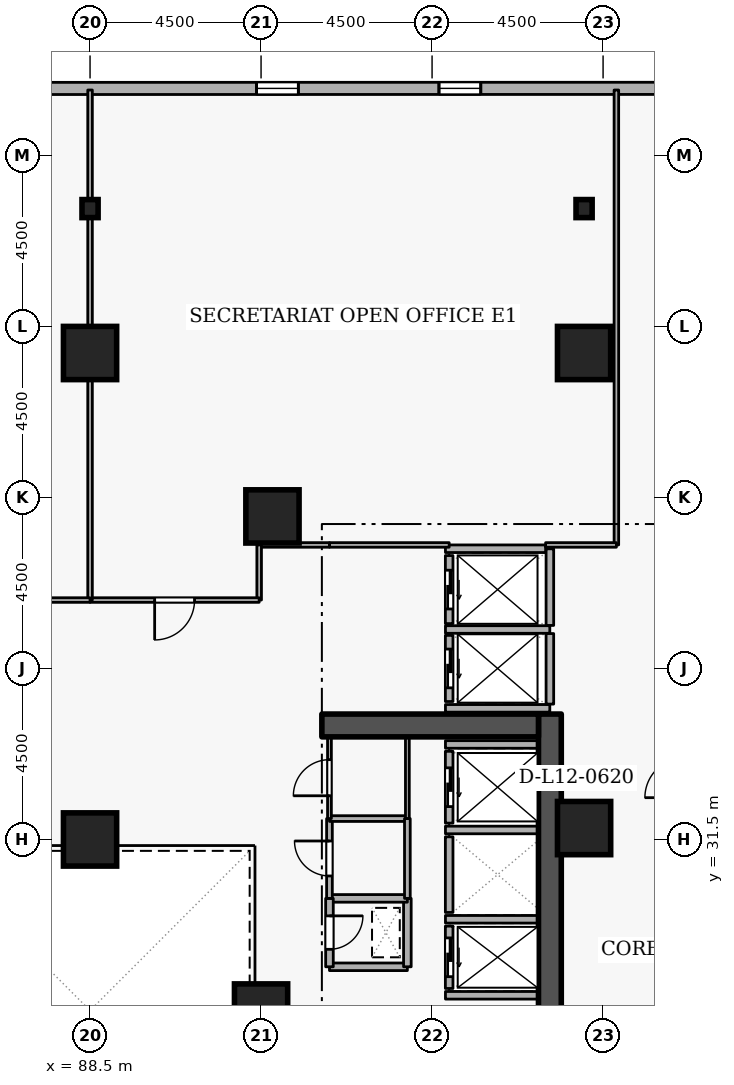
"""IFC4 building model, lengths in metres.
Left out: names, types, materials, properties, quantities, classifications, styles, units other than length and angle.
Written with IfcOpenShell. Run it as: python <this file> out.ifc"""

import sys

from ifc_helpers import new_model, si_unit, direction, frame, frame_2d, origin, origin_2d, place, context, subcontext, project, spatial, rectangle, i_section, extrude, element, fill, save


model = new_model("IFC4")
c1 = context("Model", 3, precision=1e-05, world=origin(), true_north=direction((0.0, 1.0)))
c2 = subcontext(c1, "Body", "Model", "MODEL_VIEW")
j1 = project(units=[si_unit("LENGTHUNIT", "METRE"), si_unit("PLANEANGLEUNIT", "RADIAN")], contexts=[c1])
p1 = place(None, origin())
s1 = spatial("IfcSite", under=j1, at=p1, CompositionType="ELEMENT")
p2 = place(p1, origin())
s2 = spatial("IfcBuilding", under=s1, at=p2, CompositionType="ELEMENT")
p3 = place(p2, frame((0.0, 0.0, 49.5)))
s3 = spatial("IfcBuildingStorey", under=s2, at=p3, CompositionType="ELEMENT", Elevation=49.5)
p4 = place(p3, frame((100.6, 19.2, 0.0), z_axis=(0.0, 0.0, 1.0), x_axis=(0.0, 1.0, 0.0)))
e1 = element("IfcWall", 1, at=p4, inside=s3, PredefinedType="SHEAR", context=c2, shape_type="SweptSolid", body=[
    extrude(rectangle(XDim=15.6, YDim=0.6, at=frame_2d((7.8, 0.0))), origin(), (0.0, 0.0, 1.0), 4.2),
])
p5 = place(p3, frame((94.6, 34.5, 0.0), z_axis=(0.0, 0.0, 1.0), x_axis=(1.0, 0.0, 0.0)))
e2 = element("IfcWall", 2, at=p5, inside=s3, PredefinedType="SHEAR", context=c2, shape_type="SweptSolid", body=[
    extrude(rectangle(XDim=5.7, YDim=0.6, at=frame_2d((2.85, 0.0))), origin(), (0.0, 0.0, 1.0), 4.2),
])
for number, where, z_axis, x_axis in (
    (3, (101.5, 44.3, 0.0), (0.0, 0.0, 1.0), (1.0, 0.0, 0.0)),
    (4, (88.5, 44.3, 0.0), (0.0, 0.0, 1.0), (1.0, 0.0, 0.0)),
    (5, (93.3, 40.0, 0.0), (0.0, 0.0, 1.0), (1.0, 0.0, 0.0)),
    (6, (101.5, 31.8, 0.0), (0.0, 0.0, 1.0), (1.0, 0.0, 0.0)),
    (7, (93.0, 27.0, 0.0), (0.0, 0.0, 1.0), (1.0, 0.0, 0.0)),
    (8, (88.5, 31.5, 0.0), (0.0, 0.0, 1.0), (1.0, 0.0, 0.0)),
):
    element("IfcColumn", number, at=place(p3, frame(where, z_axis=z_axis, x_axis=x_axis)), inside=s3, PredefinedType="COLUMN", context=c2, shape_type="SweptSolid", body=[
        extrude(rectangle(XDim=1.4, YDim=1.4, at=origin_2d()), origin(), (0.0, 0.0, 1.0), 4.2),
    ])
for number, where, z_axis, x_axis in (
    (9, (101.5, 48.1, 0.0), (0.0, 0.0, 1.0), (1.0, 0.0, 0.0)),
    (10, (88.5, 48.1, 0.0), (0.0, 0.0, 1.0), (1.0, 0.0, 0.0)),
):
    element("IfcColumn", number, at=place(p3, frame(where, z_axis=z_axis, x_axis=x_axis)), inside=s3, PredefinedType="COLUMN", context=c2, shape_type="SweptSolid", body=[
        extrude(i_section(OverallWidth=0.424, OverallDepth=0.475, WebThickness=0.048, FlangeThickness=0.077, FilletRadius=0.015, at=origin_2d()), origin(), (0.0, 0.0, 1.0), 4.2),
    ])
p6 = place(p3, frame((110.181, 51.265, 0.0), z_axis=(0.0, 0.0, 1.0), x_axis=(-0.999999988703, -0.000150313265, 0.0)))
e11 = element("IfcWall", 11, at=p6, inside=s3, PredefinedType="STANDARD", context=c2, shape_type="SweptSolid", body=[
    extrude(rectangle(XDim=35.733, YDim=0.32, at=frame_2d((17.866, 0.0))), origin(), (0.0, 0.0, 1.0), 3.3),
])
p7 = place(p6, frame((1.8, 0.0, 0.72)))
e12 = element("IfcOpeningElement", 12, at=p7, cuts=e11, PredefinedType="OPENING", context=c2, shape_type="SweptSolid", body=[
    extrude(rectangle(XDim=1.1, YDim=1.8, at=frame_2d((0.55, 0.9))), frame((0.0, 0.17, 0.0), z_axis=(0.0, -1.0, 0.0), x_axis=(1.0, 0.0, 0.0)), (0.0, 0.0, 1.0), 0.34),
])
p8 = place(p6, frame((11.4, 0.0, 0.72)))
e13 = element("IfcOpeningElement", 13, at=p8, cuts=e11, PredefinedType="OPENING", context=c2, shape_type="SweptSolid", body=[
    extrude(rectangle(XDim=1.1, YDim=1.8, at=frame_2d((0.55, 0.9))), frame((0.0, 0.17, 0.0), z_axis=(0.0, -1.0, 0.0), x_axis=(1.0, 0.0, 0.0)), (0.0, 0.0, 1.0), 0.34),
])
p9 = place(p6, frame((16.2, 0.0, 0.72)))
e14 = element("IfcOpeningElement", 14, at=p9, cuts=e11, PredefinedType="OPENING", context=c2, shape_type="SweptSolid", body=[
    extrude(rectangle(XDim=1.1, YDim=1.8, at=frame_2d((0.55, 0.9))), frame((0.0, 0.17, 0.0), z_axis=(0.0, -1.0, 0.0), x_axis=(1.0, 0.0, 0.0)), (0.0, 0.0, 1.0), 0.34),
])
p10 = place(p6, frame((25.8, 0.0, 0.72)))
e15 = element("IfcOpeningElement", 15, at=p10, cuts=e11, PredefinedType="OPENING", context=c2, shape_type="SweptSolid", body=[
    extrude(rectangle(XDim=1.1, YDim=1.8, at=frame_2d((0.55, 0.9))), frame((0.0, 0.17, 0.0), z_axis=(0.0, -1.0, 0.0), x_axis=(1.0, 0.0, 0.0)), (0.0, 0.0, 1.0), 0.34),
])
p11 = place(p6, frame((30.6, 0.0, 0.72)))
e16 = element("IfcOpeningElement", 16, at=p11, cuts=e11, PredefinedType="OPENING", context=c2, shape_type="SweptSolid", body=[
    extrude(rectangle(XDim=1.1, YDim=1.8, at=frame_2d((0.55, 0.9))), frame((0.0, 0.17, 0.0), z_axis=(0.0, -1.0, 0.0), x_axis=(1.0, 0.0, 0.0)), (0.0, 0.0, 1.0), 0.34),
])
p12 = place(p3, frame((97.95, 29.22, 0.0), z_axis=(0.0, 0.0, 1.0), x_axis=(0.0, -1.0, 0.0)))
e17 = element("IfcWall", 17, at=p12, inside=s3, PredefinedType="STANDARD", context=c2, shape_type="SweptSolid", body=[
    extrude(rectangle(XDim=1.64, YDim=0.2, at=frame_2d((0.82, 0.0))), origin(), (0.0, 0.0, 1.0), 3.94),
])
p13 = place(p12, frame((0.31, 0.0, 0.0)))
e18 = element("IfcOpeningElement", 18, at=p13, cuts=e17, PredefinedType="OPENING", context=c2, shape_type="SweptSolid", body=[
    extrude(rectangle(XDim=1.02, YDim=2.06, at=frame_2d((0.51, 1.03))), frame((0.0, 0.11, 0.0), z_axis=(0.0, -1.0, 0.0), x_axis=(1.0, 0.0, 0.0)), (0.0, 0.0, 1.0), 0.22),
])
p14 = place(p3, frame((97.95, 31.57, 0.0), z_axis=(0.0, 0.0, 1.0), x_axis=(0.0, -1.0, 0.0)))
e19 = element("IfcWall", 19, at=p14, inside=s3, PredefinedType="STANDARD", context=c2, shape_type="SweptSolid", body=[
    extrude(rectangle(XDim=1.99, YDim=0.2, at=frame_2d((0.995, 0.0))), origin(), (0.0, 0.0, 1.0), 3.94),
])
p15 = place(p3, frame((97.95, 33.82, 0.0), z_axis=(0.0, 0.0, 1.0), x_axis=(0.0, -1.0, 0.0)))
e20 = element("IfcWall", 20, at=p15, inside=s3, PredefinedType="STANDARD", context=c2, shape_type="SweptSolid", body=[
    extrude(rectangle(XDim=1.89, YDim=0.2, at=frame_2d((0.945, 0.0))), origin(), (0.0, 0.0, 1.0), 3.94),
])
p16 = place(p15, frame((0.435, 0.0, 0.0)))
e21 = element("IfcOpeningElement", 21, at=p16, cuts=e20, PredefinedType="OPENING", context=c2, shape_type="SweptSolid", body=[
    extrude(rectangle(XDim=1.02, YDim=2.06, at=frame_2d((0.51, 1.03))), frame((0.0, 0.11, 0.0), z_axis=(0.0, -1.0, 0.0), x_axis=(1.0, 0.0, 0.0)), (0.0, 0.0, 1.0), 0.22),
])
p17 = place(p3, frame((97.95, 36.87, 0.0), z_axis=(0.0, 0.0, 1.0), x_axis=(0.0, -1.0, 0.0)))
e22 = element("IfcWall", 22, at=p17, inside=s3, PredefinedType="STANDARD", context=c2, shape_type="SweptSolid", body=[
    extrude(rectangle(XDim=1.74, YDim=0.2, at=frame_2d((0.87, 0.0))), origin(), (0.0, 0.0, 1.0), 3.94),
])
p18 = place(p17, frame((0.36, 0.0, 0.0)))
e23 = element("IfcOpeningElement", 23, at=p18, cuts=e22, PredefinedType="OPENING", context=c2, shape_type="SweptSolid", body=[
    extrude(rectangle(XDim=1.02, YDim=2.06, at=frame_2d((0.51, 1.03))), frame((0.0, 0.11, 0.0), z_axis=(0.0, -1.0, 0.0), x_axis=(1.0, 0.0, 0.0)), (0.0, 0.0, 1.0), 0.22),
])
p19 = place(p3, frame((97.95, 38.97, 0.0), z_axis=(0.0, 0.0, 1.0), x_axis=(0.0, -1.0, 0.0)))
e24 = element("IfcWall", 24, at=p19, inside=s3, PredefinedType="STANDARD", context=c2, shape_type="SweptSolid", body=[
    extrude(rectangle(XDim=1.79, YDim=0.2, at=frame_2d((0.895, 0.0))), origin(), (0.0, 0.0, 1.0), 3.94),
])
p20 = place(p19, frame((0.385, 0.0, 0.0)))
e25 = element("IfcOpeningElement", 25, at=p20, cuts=e24, PredefinedType="OPENING", context=c2, shape_type="SweptSolid", body=[
    extrude(rectangle(XDim=1.02, YDim=2.06, at=frame_2d((0.51, 1.03))), frame((0.0, 0.11, 0.0), z_axis=(0.0, -1.0, 0.0), x_axis=(1.0, 0.0, 0.0)), (0.0, 0.0, 1.0), 0.22),
])
for number, where, z_axis, x_axis in (
    (26, (97.852, 29.4, 0.0), (0.0, 0.0, 1.0), (1.0, 0.0, 0.0)),
    (27, (97.852, 27.4, 0.0), (0.0, 0.0, 1.0), (1.0, 0.0, 0.0)),
    (28, (97.852, 31.75, 0.0), (0.0, 0.0, 1.0), (1.0, 0.0, 0.0)),
    (29, (97.852, 34.0, 0.0), (0.0, 0.0, 1.0), (1.0, 0.0, 0.0)),
):
    element("IfcWall", number, at=place(p3, frame(where, z_axis=z_axis, x_axis=x_axis)), inside=s3, PredefinedType="STANDARD", context=c2, shape_type="SweptSolid", body=[
        extrude(rectangle(XDim=2.436, YDim=0.2, at=frame_2d((1.218, 0.0))), origin(), (0.0, 0.0, 1.0), 3.94),
    ])
for number, where, z_axis, x_axis in (
    (30, (97.852, 37.025, 0.0), (0.0, 0.0, 1.0), (1.0, 0.0, 0.0)),
    (31, (97.852, 34.95, 0.0), (0.0, 0.0, 1.0), (1.0, 0.0, 0.0)),
):
    element("IfcWall", number, at=place(p3, frame(where, z_axis=z_axis, x_axis=x_axis)), inside=s3, PredefinedType="STANDARD", context=c2, shape_type="SweptSolid", body=[
        extrude(rectangle(XDim=2.746, YDim=0.2, at=frame_2d((1.373, 0.0))), origin(), (0.0, 0.0, 1.0), 3.94),
    ])
p21 = place(p3, frame((100.6, 35.062, 0.0), z_axis=(0.0, 0.0, 1.0), x_axis=(0.0, 1.0, 0.0)))
e32 = element("IfcWall", 32, at=p21, inside=s3, PredefinedType="STANDARD", context=c2, shape_type="SweptSolid", body=[
    extrude(rectangle(XDim=1.856, YDim=0.2, at=frame_2d((0.928, 0.0))), origin(), (0.0, 0.0, 1.0), 3.94),
])
p22 = place(p3, frame((100.6, 37.132, 0.0), z_axis=(0.0, 0.0, 1.0), x_axis=(0.0, 1.0, 0.0)))
e33 = element("IfcWall", 33, at=p22, inside=s3, PredefinedType="STANDARD", context=c2, shape_type="SweptSolid", body=[
    extrude(rectangle(XDim=2.016, YDim=0.2, at=frame_2d((1.008, 0.0))), origin(), (0.0, 0.0, 1.0), 3.94),
])
p23 = place(p3, frame((97.852, 39.15, 0.0), z_axis=(0.0, 0.0, 1.0), x_axis=(1.0, 0.0, 0.0)))
e34 = element("IfcWall", 34, at=p23, inside=s3, PredefinedType="STANDARD", context=c2, shape_type="SweptSolid", body=[
    extrude(rectangle(XDim=2.636, YDim=0.2, at=frame_2d((1.318, 0.0))), origin(), (0.0, 0.0, 1.0), 3.94),
])
p24 = place(p3, frame((94.8, 28.15, 0.0), z_axis=(0.0, 0.0, 1.0), x_axis=(1.0, 0.0, 0.0)))
e35 = element("IfcWall", 35, at=p24, inside=s3, PredefinedType="STANDARD", context=c2, shape_type="SweptSolid", body=[
    extrude(rectangle(XDim=2.05, YDim=0.2, at=frame_2d((1.025, 0.0))), origin(), (0.0, 0.0, 1.0), 3.94),
])
p25 = place(p3, frame((96.85, 28.15, 0.0), z_axis=(0.0, 0.0, 1.0), x_axis=(0.0, 1.0, 0.0)))
e36 = element("IfcWall", 36, at=p25, inside=s3, PredefinedType="STANDARD", context=c2, shape_type="SweptSolid", body=[
    extrude(rectangle(XDim=1.8, YDim=0.2, at=frame_2d((0.9, 0.0))), origin(), (0.0, 0.0, 1.0), 3.94),
])
p26 = place(p3, frame((96.85, 29.95, 0.0), z_axis=(0.0, 0.0, 1.0), x_axis=(-1.0, 0.0, 0.0)))
e37 = element("IfcWall", 37, at=p26, inside=s3, PredefinedType="STANDARD", context=c2, shape_type="SweptSolid", body=[
    extrude(rectangle(XDim=2.05, YDim=0.2, at=frame_2d((1.025, 0.0))), origin(), (0.0, 0.0, 1.0), 3.94),
])
p27 = place(p3, frame((94.8, 29.95, 0.0), z_axis=(0.0, 0.0, 1.0), x_axis=(0.0, -1.0, 0.0)))
e38 = element("IfcWall", 38, at=p27, inside=s3, PredefinedType="STANDARD", context=c2, shape_type="SweptSolid", body=[
    extrude(rectangle(XDim=1.8, YDim=0.2, at=frame_2d((0.9, 0.0))), origin(), (0.0, 0.0, 1.0), 3.94),
])
p28 = place(p27, frame((0.46, 0.0, 0.0)))
e39 = element("IfcOpeningElement", 39, at=p28, cuts=e38, PredefinedType="OPENING", context=c2, shape_type="SweptSolid", body=[
    extrude(rectangle(XDim=0.88, YDim=2.04, at=frame_2d((0.44, 1.02))), frame((0.0, 0.11, 0.0), z_axis=(0.0, -1.0, 0.0), x_axis=(1.0, 0.0, 0.0)), (0.0, 0.0, 1.0), 0.22),
])
p29 = place(p3, frame((94.8, 29.95, 0.0), z_axis=(0.0, 0.0, 1.0), x_axis=(0.0, 1.0, 0.0)))
e40 = element("IfcWall", 40, at=p29, inside=s3, PredefinedType="PARTITIONING", context=c2, shape_type="SweptSolid", body=[
    extrude(rectangle(XDim=2.1, YDim=0.15, at=frame_2d((1.05, 0.0))), origin(), (0.0, 0.0, 1.0), 3.94),
])
p30 = place(p29, frame((0.59, 0.0, 0.0)))
e41 = element("IfcOpeningElement", 41, at=p30, cuts=e40, PredefinedType="OPENING", context=c2, shape_type="SweptSolid", body=[
    extrude(rectangle(XDim=0.92, YDim=2.08, at=frame_2d((0.46, 1.04))), frame((0.0, 0.085, 0.0), z_axis=(0.0, -1.0, 0.0), x_axis=(1.0, 0.0, 0.0)), (0.0, 0.0, 1.0), 0.17),
])
p31 = place(p3, frame((94.8, 32.05, 0.0), z_axis=(0.0, 0.0, 1.0), x_axis=(1.0, 0.0, 0.0)))
e42 = element("IfcWall", 42, at=p31, inside=s3, PredefinedType="PARTITIONING", context=c2, shape_type="SweptSolid", body=[
    extrude(rectangle(XDim=2.05, YDim=0.15, at=frame_2d((1.025, 0.0))), origin(), (0.0, 0.0, 1.0), 3.94),
])
p32 = place(p3, frame((96.85, 32.05, 0.0), z_axis=(0.0, 0.0, 1.0), x_axis=(0.0, -1.0, 0.0)))
e43 = element("IfcWall", 43, at=p32, inside=s3, PredefinedType="PARTITIONING", context=c2, shape_type="SweptSolid", body=[
    extrude(rectangle(XDim=2.1, YDim=0.15, at=frame_2d((1.05, 0.0))), origin(), (0.0, 0.0, 1.0), 3.94),
])
p33 = place(p3, frame((94.8, 32.05, 0.0), z_axis=(0.0, 0.0, 1.0), x_axis=(0.0, 1.0, 0.0)))
e44 = element("IfcWall", 44, at=p33, inside=s3, PredefinedType="PARTITIONING", context=c2, shape_type="SweptSolid", body=[
    extrude(rectangle(XDim=2.15, YDim=0.1, at=frame_2d((1.075, 0.0))), origin(), (0.0, 0.0, 1.0), 3.94),
])
p34 = place(p33, frame((0.6, 0.0, 0.0)))
e45 = element("IfcOpeningElement", 45, at=p34, cuts=e44, PredefinedType="OPENING", context=c2, shape_type="SweptSolid", body=[
    extrude(rectangle(XDim=0.95, YDim=2.1, at=frame_2d((0.475, 1.05))), frame((0.0, 0.06, 0.0), z_axis=(0.0, -1.0, 0.0), x_axis=(1.0, 0.0, 0.0)), (0.0, 0.0, 1.0), 0.12),
])
p35 = place(p3, frame((96.85, 34.2, 0.0), z_axis=(0.0, 0.0, 1.0), x_axis=(0.0, -1.0, 0.0)))
e46 = element("IfcWall", 46, at=p35, inside=s3, PredefinedType="PARTITIONING", context=c2, shape_type="SweptSolid", body=[
    extrude(rectangle(XDim=2.15, YDim=0.1, at=frame_2d((1.075, 0.0))), origin(), (0.0, 0.0, 1.0), 3.94),
])
p36 = place(p3, frame((97.95, 39.25, 0.0), z_axis=(0.0, 0.0, 1.0), x_axis=(-1.0, 0.0, 0.0)))
e47 = element("IfcWall", 47, at=p36, inside=s3, PredefinedType="PARTITIONING", context=c2, shape_type="SweptSolid", body=[
    extrude(rectangle(XDim=3.15, YDim=0.12, at=frame_2d((1.575, 0.0))), origin(), (0.0, 0.0, 1.0), 3.94),
])
p37 = place(p3, frame((94.8, 39.25, 0.0), z_axis=(0.0, 0.0, 1.0), x_axis=(-1.0, 0.0, 0.0)))
e48 = element("IfcWall", 48, at=p37, inside=s3, PredefinedType="PARTITIONING", context=c2, shape_type="SweptSolid", body=[
    extrude(rectangle(XDim=1.85, YDim=0.12, at=frame_2d((0.925, 0.0))), origin(), (0.0, 0.0, 1.0), 3.94),
])
p38 = place(p3, frame((92.95, 39.25, 0.0), z_axis=(0.0, 0.0, 1.0), x_axis=(0.0, -1.0, 0.0)))
e49 = element("IfcWall", 49, at=p38, inside=s3, PredefinedType="PARTITIONING", context=c2, shape_type="SweptSolid", body=[
    extrude(rectangle(XDim=1.45, YDim=0.12, at=frame_2d((0.725, 0.0))), origin(), (0.0, 0.0, 1.0), 3.94),
])
p39 = place(p3, frame((92.95, 37.8, 0.0), z_axis=(0.0, 0.0, 1.0), x_axis=(-1.0, 0.0, 0.0)))
e50 = element("IfcWall", 50, at=p39, inside=s3, PredefinedType="PARTITIONING", context=c2, shape_type="SweptSolid", body=[
    extrude(rectangle(XDim=4.45, YDim=0.12, at=frame_2d((2.225, 0.0))), origin(), (0.0, 0.0, 1.0), 3.94),
])
p40 = place(p39, frame((1.7, 0.0, 0.0)))
e51 = element("IfcOpeningElement", 51, at=p40, cuts=e50, PredefinedType="OPENING", context=c2, shape_type="SweptSolid", body=[
    extrude(rectangle(XDim=1.05, YDim=2.1, at=frame_2d((0.525, 1.05))), frame((0.0, 0.07, 0.0), z_axis=(0.0, -1.0, 0.0), x_axis=(1.0, 0.0, 0.0)), (0.0, 0.0, 1.0), 0.14),
])
p41 = place(p3, frame((88.5, 37.8, 0.0), z_axis=(0.0, 0.0, 1.0), x_axis=(0.0, 1.0, 0.0)))
e52 = element("IfcWall", 52, at=p41, inside=s3, PredefinedType="PARTITIONING", context=c2, shape_type="SweptSolid", body=[
    extrude(rectangle(XDim=13.42, YDim=0.12, at=frame_2d((6.71, 0.0))), origin(), (0.0, 0.0, 1.0), 3.532),
])
p42 = place(p3, frame((102.35, 51.22, 0.0), z_axis=(0.0, 0.0, 1.0), x_axis=(0.0, -1.0, 0.0)))
e53 = element("IfcWall", 53, at=p42, inside=s3, PredefinedType="PARTITIONING", context=c2, shape_type="SweptSolid", body=[
    extrude(rectangle(XDim=11.97, YDim=0.12, at=frame_2d((5.985, 0.0))), origin(), (0.0, 0.0, 1.0), 3.94),
])
p43 = place(p3, frame((102.35, 39.25, 0.0), z_axis=(0.0, 0.0, 1.0), x_axis=(-1.0, 0.0, 0.0)))
e54 = element("IfcWall", 54, at=p43, inside=s3, PredefinedType="PARTITIONING", context=c2, shape_type="SweptSolid", body=[
    extrude(rectangle(XDim=1.862, YDim=0.12, at=frame_2d((0.931, 0.0))), origin(), (0.0, 0.0, 1.0), 3.94),
])
p44 = place(p3, frame((88.5, 37.8, 0.0), z_axis=(0.0, 0.0, 1.0), x_axis=(-1.0, 0.0, 0.0)))
e55 = element("IfcWall", 55, at=p44, inside=s3, PredefinedType="PARTITIONING", context=c2, shape_type="SweptSolid", body=[
    extrude(rectangle(XDim=4.45, YDim=0.12, at=frame_2d((2.225, 0.0))), origin(), (0.0, 0.0, 1.0), 3.94),
])
p45 = place(p44, frame((1.7, 0.0, 0.0)))
e56 = element("IfcOpeningElement", 56, at=p45, cuts=e55, PredefinedType="OPENING", context=c2, shape_type="SweptSolid", body=[
    extrude(rectangle(XDim=1.05, YDim=2.1, at=frame_2d((0.525, 1.05))), frame((0.0, 0.07, 0.0), z_axis=(0.0, -1.0, 0.0), x_axis=(1.0, 0.0, 0.0)), (0.0, 0.0, 1.0), 0.14),
])
p46 = place(p8, origin())
e57 = element("IfcWindow", 57, at=p46, inside=s3, PartitioningType="SINGLE_PANEL", PredefinedType="WINDOW", context=c2, shape_type="SweptSolid", body=[
    extrude(rectangle(XDim=1.1, YDim=1.8, at=frame_2d((0.55, 0.9))), frame((0.0, 0.03, 0.0), z_axis=(0.0, -1.0, 0.0), x_axis=(1.0, 0.0, 0.0)), (0.0, 0.0, 1.0), 0.06),
])
fill(e13, e57)
p47 = place(p9, origin())
e58 = element("IfcWindow", 58, at=p47, inside=s3, PartitioningType="SINGLE_PANEL", PredefinedType="WINDOW", context=c2, shape_type="SweptSolid", body=[
    extrude(rectangle(XDim=1.1, YDim=1.8, at=frame_2d((0.55, 0.9))), frame((0.0, 0.03, 0.0), z_axis=(0.0, -1.0, 0.0), x_axis=(1.0, 0.0, 0.0)), (0.0, 0.0, 1.0), 0.06),
])
fill(e14, e58)
p48 = place(p13, origin())
e59 = element("IfcDoor", 59, at=p48, inside=s3, OperationType="SLIDING_TO_LEFT", PredefinedType="DOOR", context=c2, shape_type="SweptSolid", body=[
    extrude(rectangle(XDim=1.02, YDim=2.06, at=frame_2d((0.51, 1.03))), frame((0.0, 0.025, 0.0), z_axis=(0.0, -1.0, 0.0), x_axis=(1.0, 0.0, 0.0)), (0.0, 0.0, 1.0), 0.05),
])
fill(e18, e59)
p49 = place(p16, origin())
e60 = element("IfcDoor", 60, at=p49, inside=s3, OperationType="SLIDING_TO_LEFT", PredefinedType="DOOR", context=c2, shape_type="SweptSolid", body=[
    extrude(rectangle(XDim=1.02, YDim=2.06, at=frame_2d((0.51, 1.03))), frame((0.0, 0.025, 0.0), z_axis=(0.0, -1.0, 0.0), x_axis=(1.0, 0.0, 0.0)), (0.0, 0.0, 1.0), 0.05),
])
fill(e21, e60)
p50 = place(p18, origin())
e61 = element("IfcDoor", 61, at=p50, inside=s3, OperationType="SLIDING_TO_LEFT", PredefinedType="DOOR", context=c2, shape_type="SweptSolid", body=[
    extrude(rectangle(XDim=1.02, YDim=2.06, at=frame_2d((0.51, 1.03))), frame((0.0, 0.025, 0.0), z_axis=(0.0, -1.0, 0.0), x_axis=(1.0, 0.0, 0.0)), (0.0, 0.0, 1.0), 0.05),
])
fill(e23, e61)
p51 = place(p20, origin())
e62 = element("IfcDoor", 62, at=p51, inside=s3, OperationType="SLIDING_TO_LEFT", PredefinedType="DOOR", context=c2, shape_type="SweptSolid", body=[
    extrude(rectangle(XDim=1.02, YDim=2.06, at=frame_2d((0.51, 1.03))), frame((0.0, 0.025, 0.0), z_axis=(0.0, -1.0, 0.0), x_axis=(1.0, 0.0, 0.0)), (0.0, 0.0, 1.0), 0.05),
])
fill(e25, e62)
p52 = place(p28, origin())
e63 = element("IfcDoor", 63, at=p52, inside=s3, OperationType="SINGLE_SWING_LEFT", PredefinedType="DOOR", context=c2, shape_type="SweptSolid", body=[
    extrude(rectangle(XDim=0.88, YDim=2.04, at=frame_2d((0.44, 1.02))), frame((0.0, 0.025, 0.0), z_axis=(0.0, -1.0, 0.0), x_axis=(1.0, 0.0, 0.0)), (0.0, 0.0, 1.0), 0.05),
])
fill(e39, e63)
p53 = place(p30, origin())
e64 = element("IfcDoor", 64, at=p53, inside=s3, OperationType="SINGLE_SWING_RIGHT", PredefinedType="DOOR", context=c2, shape_type="SweptSolid", body=[
    extrude(rectangle(XDim=0.92, YDim=2.08, at=frame_2d((0.46, 1.04))), frame((0.0, 0.025, 0.0), z_axis=(0.0, -1.0, 0.0), x_axis=(1.0, 0.0, 0.0)), (0.0, 0.0, 1.0), 0.05),
])
fill(e41, e64)
p54 = place(p34, origin())
e65 = element("IfcDoor", 65, at=p54, inside=s3, OperationType="SINGLE_SWING_LEFT", PredefinedType="DOOR", context=c2, shape_type="SweptSolid", body=[
    extrude(rectangle(XDim=0.95, YDim=2.1, at=frame_2d((0.475, 1.05))), frame((0.0, 0.025, 0.0), z_axis=(0.0, -1.0, 0.0), x_axis=(1.0, 0.0, 0.0)), (0.0, 0.0, 1.0), 0.05),
])
fill(e45, e65)
p55 = place(p40, origin())
e66 = element("IfcDoor", 66, at=p55, inside=s3, OperationType="SINGLE_SWING_RIGHT", PredefinedType="DOOR", context=c2, shape_type="SweptSolid", body=[
    extrude(rectangle(XDim=1.05, YDim=2.1, at=frame_2d((0.525, 1.05))), frame((0.0, 0.025, 0.0), z_axis=(0.0, -1.0, 0.0), x_axis=(1.0, 0.0, 0.0)), (0.0, 0.0, 1.0), 0.05),
])
fill(e51, e66)
save(model, sys.argv[1])
